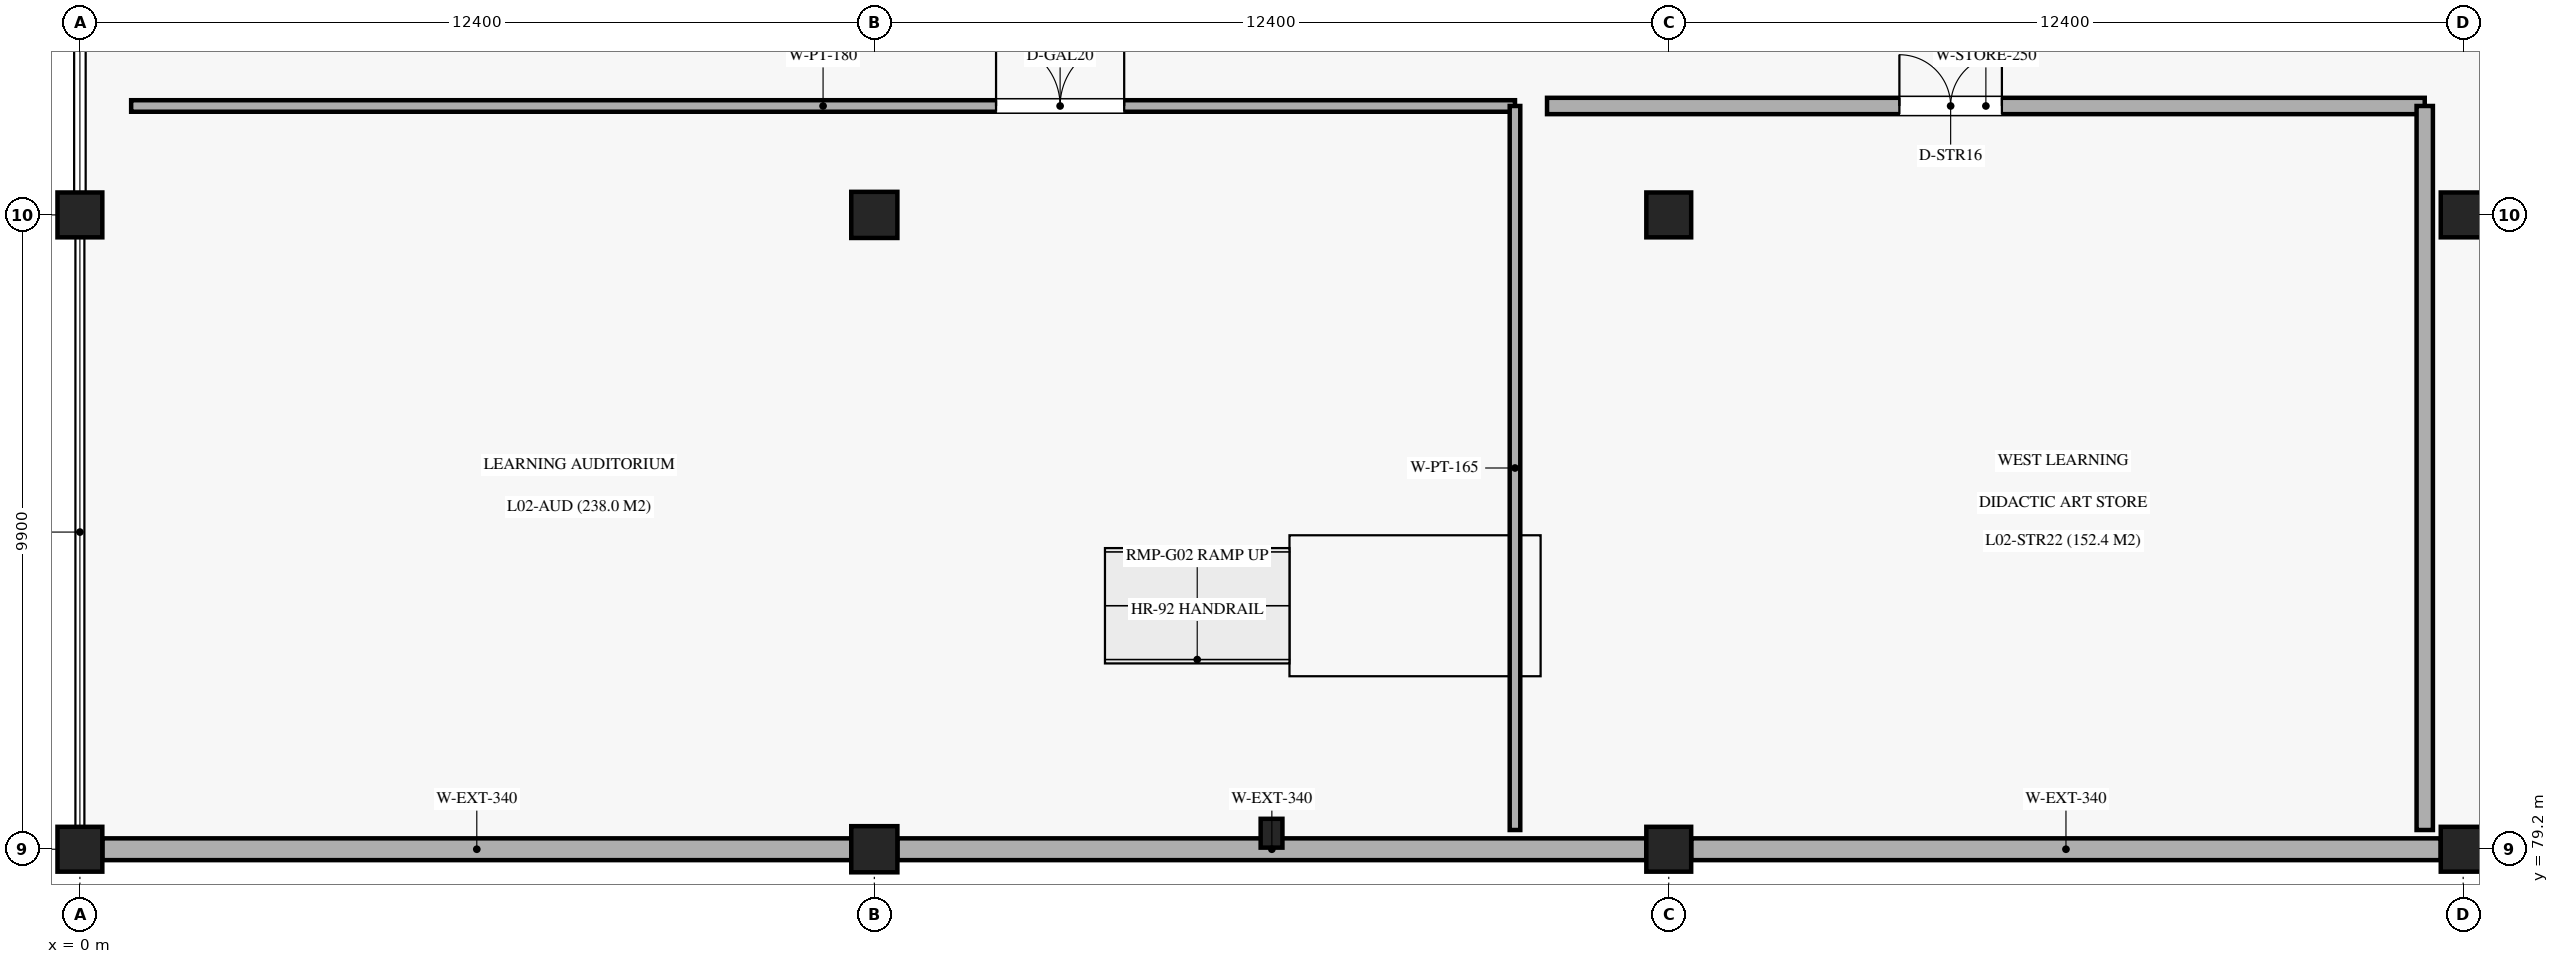
"""IFC4 building model, lengths in metres.
Left out: names, types, materials, properties, quantities, classifications, styles, units other than length and angle.
Written with IfcOpenShell. Run it as: python <this file> out.ifc"""

import sys

from ifc_helpers import new_model, si_unit, direction, frame, frame_2d, origin, origin_2d, place, context, subcontext, project, spatial, rectangle, circle, extrude, element, fill, save


model = new_model("IFC4")
c1 = context("Model", 3, precision=1e-05, world=origin(), true_north=direction((0.0, 1.0)))
c2 = subcontext(c1, "Body", "Model", "MODEL_VIEW")
j1 = project(units=[si_unit("LENGTHUNIT", "METRE"), si_unit("PLANEANGLEUNIT", "RADIAN")], contexts=[c1])
p1 = place(None, origin())
s1 = spatial("IfcSite", under=j1, at=p1, CompositionType="ELEMENT")
p2 = place(p1, origin())
s2 = spatial("IfcBuilding", under=s1, at=p2, CompositionType="ELEMENT")
p3 = place(p2, frame((0.0, 0.0, 10.88)))
s3 = spatial("IfcBuildingStorey", under=s2, at=p3, CompositionType="ELEMENT", Elevation=10.88)
for number, where, z_axis, x_axis in (
    (1, (0.0, 79.2, 0.0), (0.0, 0.0, 1.0), (1.0, 0.0, 0.0)),
    (2, (0.0, 89.1, 0.0), (0.0, 0.0, 1.0), (1.0, 0.0, 0.0)),
):
    element("IfcColumn", number, at=place(p3, frame(where, z_axis=z_axis, x_axis=x_axis)), inside=s3, PredefinedType="COLUMN", context=c2, shape_type="SweptSolid", body=[
        extrude(rectangle(XDim=0.7, YDim=0.7, at=origin_2d()), origin(), (0.0, 0.0, 1.0), 5.44),
    ])
for number, where, z_axis, x_axis in (
    (3, (12.4, 79.2, 0.0), (0.0, 0.0, 1.0), (1.0, 0.0, 0.0)),
    (4, (12.4, 89.1, 0.0), (0.0, 0.0, 1.0), (1.0, 0.0, 0.0)),
):
    element("IfcColumn", number, at=place(p3, frame(where, z_axis=z_axis, x_axis=x_axis)), inside=s3, PredefinedType="COLUMN", context=c2, shape_type="SweptSolid", body=[
        extrude(circle(Radius=0.36, at=origin_2d()), origin(), (0.0, 0.0, 1.0), 5.44),
    ])
for number, where, z_axis, x_axis in (
    (5, (24.8, 79.2, 0.0), (0.0, 0.0, 1.0), (1.0, 0.0, 0.0)),
    (6, (24.8, 89.1, 0.0), (0.0, 0.0, 1.0), (1.0, 0.0, 0.0)),
    (7, (37.2, 79.2, 0.0), (0.0, 0.0, 1.0), (1.0, 0.0, 0.0)),
    (8, (37.2, 89.1, 0.0), (0.0, 0.0, 1.0), (1.0, 0.0, 0.0)),
):
    element("IfcColumn", number, at=place(p3, frame(where, z_axis=z_axis, x_axis=x_axis)), inside=s3, PredefinedType="COLUMN", context=c2, shape_type="SweptSolid", body=[
        extrude(rectangle(XDim=0.7, YDim=0.7, at=origin_2d()), origin(), (0.0, 0.0, 1.0), 5.44),
    ])
p4 = place(p3, frame((18.6, 79.45, 0.0), z_axis=(0.0, 0.0, 1.0), x_axis=(1.0, 0.0, 0.0)))
e9 = element("IfcColumn", 9, at=p4, inside=s3, PredefinedType="PILASTER", context=c2, shape_type="SweptSolid", body=[
    extrude(rectangle(XDim=0.34, YDim=0.45, at=origin_2d()), origin(), (0.0, 0.0, 1.0), 5.44),
])
for number, where, z_axis, x_axis in (
    (10, (0.35, 79.2, 0.0), (0.0, 0.0, 1.0), (1.0, 0.0, 0.0)),
    (11, (12.76, 79.2, 0.0), (0.0, 0.0, 1.0), (1.0, 0.0, 0.0)),
):
    element("IfcWall", number, at=place(p3, frame(where, z_axis=z_axis, x_axis=x_axis)), inside=s3, PredefinedType="SOLIDWALL", context=c2, shape_type="SweptSolid", body=[
        extrude(rectangle(XDim=11.69, YDim=0.34, at=frame_2d((5.845, 0.0))), origin(), (0.0, 0.0, 1.0), 4.31),
    ])
p5 = place(p3, frame((25.15, 79.2, 0.0), z_axis=(0.0, 0.0, 1.0), x_axis=(1.0, 0.0, 0.0)))
e12 = element("IfcWall", 12, at=p5, inside=s3, PredefinedType="SOLIDWALL", context=c2, shape_type="SweptSolid", body=[
    extrude(rectangle(XDim=11.7, YDim=0.34, at=frame_2d((5.85, 0.0))), origin(), (0.0, 0.0, 1.0), 4.31),
])
p6 = place(p3, frame((0.8, 90.8, 0.0), z_axis=(0.0, 0.0, 1.0), x_axis=(1.0, 0.0, 0.0)))
e13 = element("IfcWall", 13, at=p6, inside=s3, PredefinedType="PARTITIONING", context=c2, shape_type="SweptSolid", body=[
    extrude(rectangle(XDim=21.6, YDim=0.18, at=frame_2d((10.8, 0.0))), origin(), (0.0, 0.0, 1.0), 4.28),
])
p7 = place(p6, frame((13.5, 0.0, 0.0)))
e14 = element("IfcOpeningElement", 14, at=p7, cuts=e13, PredefinedType="OPENING", context=c2, shape_type="SweptSolid", body=[
    extrude(rectangle(XDim=2.0, YDim=2.5, at=frame_2d((1.0, 1.25))), frame((0.0, 0.1, 0.0), z_axis=(0.0, -1.0, 0.0), x_axis=(1.0, 0.0, 0.0)), (0.0, 0.0, 1.0), 0.2),
])
p8 = place(p3, frame((22.4, 79.5, 0.0), z_axis=(0.0, 0.0, 1.0), x_axis=(0.0, 1.0, 0.0)))
e15 = element("IfcWall", 15, at=p8, inside=s3, PredefinedType="PARTITIONING", context=c2, shape_type="SweptSolid", body=[
    extrude(rectangle(XDim=11.3, YDim=0.165, at=frame_2d((5.65, 0.0))), origin(), (0.0, 0.0, 1.0), 4.28),
])
p9 = place(p3, frame((22.9, 90.8, 0.0), z_axis=(0.0, 0.0, 1.0), x_axis=(1.0, 0.0, 0.0)))
e16 = element("IfcWall", 16, at=p9, inside=s3, PredefinedType="SOLIDWALL", context=c2, shape_type="SweptSolid", body=[
    extrude(rectangle(XDim=13.7, YDim=0.255, at=frame_2d((6.85, 0.0))), origin(), (0.0, 0.0, 1.0), 4.28),
])
p10 = place(p9, frame((5.5, 0.0, 0.0)))
e17 = element("IfcOpeningElement", 17, at=p10, cuts=e16, PredefinedType="OPENING", context=c2, shape_type="SweptSolid", body=[
    extrude(rectangle(XDim=1.6, YDim=2.3, at=frame_2d((0.8, 1.15))), frame((0.0, 0.137, 0.0), z_axis=(0.0, -1.0, 0.0), x_axis=(1.0, 0.0, 0.0)), (0.0, 0.0, 1.0), 0.275),
])
p11 = place(p3, frame((36.6, 79.5, 0.0), z_axis=(0.0, 0.0, 1.0), x_axis=(0.0, 1.0, 0.0)))
e18 = element("IfcWall", 18, at=p11, inside=s3, PredefinedType="SOLIDWALL", context=c2, shape_type="SweptSolid", body=[
    extrude(rectangle(XDim=11.3, YDim=0.255, at=frame_2d((5.65, 0.0))), origin(), (0.0, 0.0, 1.0), 4.28),
])
p12 = place(p7, origin())
e19 = element("IfcDoor", 19, at=p12, inside=s3, OperationType="DOUBLE_DOOR_SINGLE_SWING", PredefinedType="DOOR", context=c2, shape_type="SweptSolid", body=[
    extrude(rectangle(XDim=2.0, YDim=2.5, at=frame_2d((1.0, 1.25))), frame((0.0, 0.025, 0.0), z_axis=(0.0, -1.0, 0.0), x_axis=(1.0, 0.0, 0.0)), (0.0, 0.0, 1.0), 0.05),
])
fill(e14, e19)
p13 = place(p10, origin())
e20 = element("IfcDoor", 20, at=p13, inside=s3, OperationType="DOUBLE_DOOR_SINGLE_SWING", PredefinedType="DOOR", context=c2, shape_type="SweptSolid", body=[
    extrude(rectangle(XDim=1.6, YDim=2.3, at=frame_2d((0.8, 1.15))), frame((0.0, 0.025, 0.0), z_axis=(0.0, -1.0, 0.0), x_axis=(1.0, 0.0, 0.0)), (0.0, 0.0, 1.0), 0.05),
])
fill(e17, e20)
save(model, sys.argv[1])
